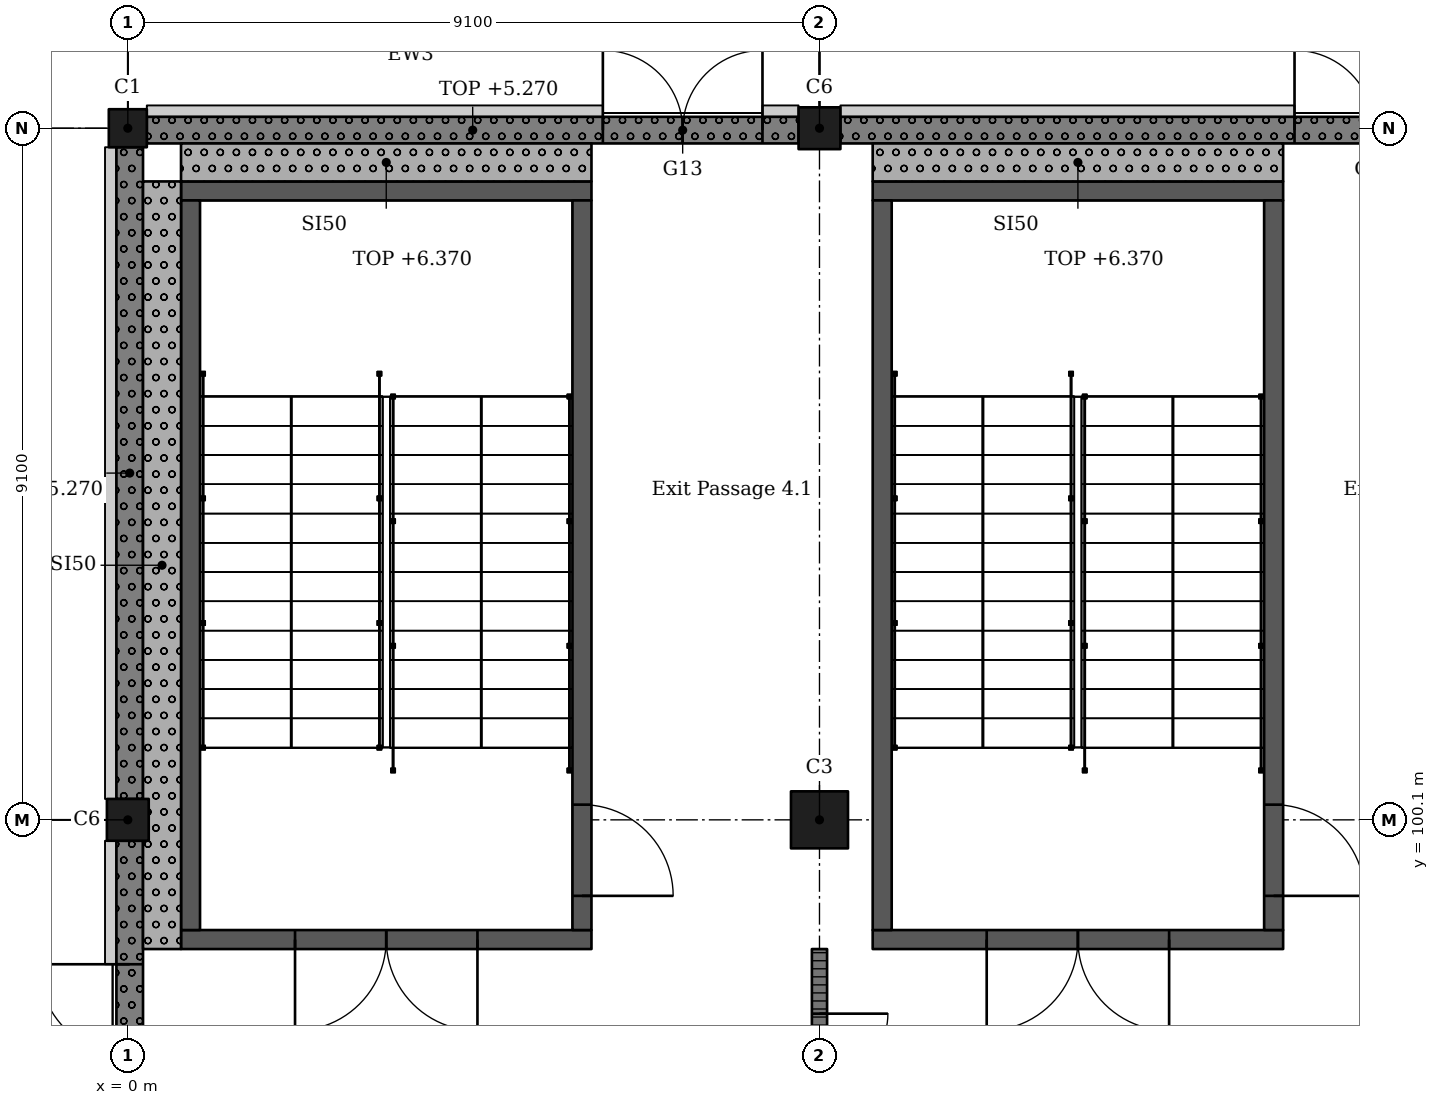
"""IFC4 building model, lengths in metres.
Left out: names, types, materials, properties, quantities, classifications, styles, units other than length and angle.
Written with IfcOpenShell. Run it as: python <this file> out.ifc"""

import sys

from ifc_helpers import new_model, si_unit, direction, frame, frame_2d, origin, origin_2d, place, context, subcontext, project, spatial, rectangle, extrude, element, fill, save


model = new_model("IFC4")
c1 = context("Model", 3, precision=1e-05, world=origin(), true_north=direction((0.0, 1.0)))
c2 = subcontext(c1, "Body", "Model", "MODEL_VIEW")
j1 = project(units=[si_unit("LENGTHUNIT", "METRE"), si_unit("PLANEANGLEUNIT", "RADIAN")], contexts=[c1])
p1 = place(None, origin())
s1 = spatial("IfcSite", under=j1, at=p1, CompositionType="ELEMENT")
p2 = place(p1, origin())
s2 = spatial("IfcBuilding", under=s1, at=p2, CompositionType="ELEMENT")
p3 = place(p2, origin())
s3 = spatial("IfcBuildingStorey", under=s2, at=p3, CompositionType="ELEMENT", Elevation=0.0)
p4 = place(p3, frame((0.0, 100.1, -0.4), z_axis=(0.0, 0.0, 1.0), x_axis=(1.0, 0.0, 0.0)))
e1 = element("IfcColumn", 1, at=p4, inside=s3, PredefinedType="COLUMN", context=c2, shape_type="SweptSolid", body=[
    extrude(rectangle(XDim=0.55, YDim=0.55, at=origin_2d()), origin(), (0.0, 0.0, 1.0), 6.77),
])
p5 = place(p3, frame((0.0, 109.2, -0.4), z_axis=(0.0, 0.0, 1.0), x_axis=(1.0, 0.0, 0.0)))
e2 = element("IfcColumn", 2, at=p5, inside=s3, PredefinedType="COLUMN", context=c2, shape_type="SweptSolid", body=[
    extrude(rectangle(XDim=0.5, YDim=0.5, at=origin_2d()), origin(), (0.0, 0.0, 1.0), 6.77),
])
p6 = place(p3, frame((9.1, 100.1, -0.4), z_axis=(0.0, 0.0, 1.0), x_axis=(1.0, 0.0, 0.0)))
e3 = element("IfcColumn", 3, at=p6, inside=s3, PredefinedType="COLUMN", context=c2, shape_type="SweptSolid", body=[
    extrude(rectangle(XDim=0.75, YDim=0.75, at=origin_2d()), origin(), (0.0, 0.0, 1.0), 6.77),
])
p7 = place(p3, frame((9.1, 109.2, -0.4), z_axis=(0.0, 0.0, 1.0), x_axis=(1.0, 0.0, 0.0)))
e4 = element("IfcColumn", 4, at=p7, inside=s3, PredefinedType="COLUMN", context=c2, shape_type="SweptSolid", body=[
    extrude(rectangle(XDim=0.55, YDim=0.55, at=origin_2d()), origin(), (0.0, 0.0, 1.0), 6.77),
])
p8 = place(p3, frame((6.1, 98.525, -0.4), z_axis=(0.0, 0.0, 1.0), x_axis=(-1.0, 0.0, 0.0)))
e5 = element("IfcWall", 5, at=p8, inside=s3, PredefinedType="SHEAR", context=c2, shape_type="SweptSolid", body=[
    extrude(rectangle(XDim=5.4, YDim=0.25, at=frame_2d((2.7, 0.0))), origin(), (0.0, 0.0, 1.0), 6.77),
])
p9 = place(p8, frame((1.5, 0.0, 0.4)))
e6 = element("IfcOpeningElement", 6, at=p9, cuts=e5, PredefinedType="OPENING", context=c2, shape_type="SweptSolid", body=[
    extrude(rectangle(XDim=2.4, YDim=2.1, at=frame_2d((1.2, 1.05))), frame((0.0, 0.135, 0.0), z_axis=(0.0, -1.0, 0.0), x_axis=(1.0, 0.0, 0.0)), (0.0, 0.0, 1.0), 0.27),
])
p10 = place(p3, frame((6.1, 108.375, -0.4), z_axis=(0.0, 0.0, 1.0), x_axis=(-1.0, 0.0, 0.0)))
e7 = element("IfcWall", 7, at=p10, inside=s3, PredefinedType="SHEAR", context=c2, shape_type="SweptSolid", body=[
    extrude(rectangle(XDim=5.4, YDim=0.25, at=frame_2d((2.7, 0.0))), origin(), (0.0, 0.0, 1.0), 6.77),
])
p11 = place(p3, frame((0.825, 108.25, -0.4), z_axis=(0.0, 0.0, 1.0), x_axis=(0.0, -1.0, 0.0)))
e8 = element("IfcWall", 8, at=p11, inside=s3, PredefinedType="SHEAR", context=c2, shape_type="SweptSolid", body=[
    extrude(rectangle(XDim=9.6, YDim=0.25, at=frame_2d((4.8, 0.0))), origin(), (0.0, 0.0, 1.0), 6.77),
])
p12 = place(p3, frame((5.975, 108.25, -0.4), z_axis=(0.0, 0.0, 1.0), x_axis=(0.0, -1.0, 0.0)))
e9 = element("IfcWall", 9, at=p12, inside=s3, PredefinedType="SHEAR", context=c2, shape_type="SweptSolid", body=[
    extrude(rectangle(XDim=9.6, YDim=0.25, at=frame_2d((4.8, 0.0))), origin(), (0.0, 0.0, 1.0), 6.77),
])
p13 = place(p12, frame((7.95, 0.0, 0.4)))
e10 = element("IfcOpeningElement", 10, at=p13, cuts=e9, PredefinedType="OPENING", context=c2, shape_type="SweptSolid", body=[
    extrude(rectangle(XDim=1.2, YDim=2.1, at=frame_2d((0.6, 1.05))), frame((0.0, 0.135, 0.0), z_axis=(0.0, -1.0, 0.0), x_axis=(1.0, 0.0, 0.0)), (0.0, 0.0, 1.0), 0.27),
])
p14 = place(p3, frame((15.2, 98.525, -0.4), z_axis=(0.0, 0.0, 1.0), x_axis=(-1.0, 0.0, 0.0)))
e11 = element("IfcWall", 11, at=p14, inside=s3, PredefinedType="SHEAR", context=c2, shape_type="SweptSolid", body=[
    extrude(rectangle(XDim=5.4, YDim=0.25, at=frame_2d((2.7, 0.0))), origin(), (0.0, 0.0, 1.0), 6.77),
])
p15 = place(p14, frame((1.5, 0.0, 0.4)))
e12 = element("IfcOpeningElement", 12, at=p15, cuts=e11, PredefinedType="OPENING", context=c2, shape_type="SweptSolid", body=[
    extrude(rectangle(XDim=2.4, YDim=2.1, at=frame_2d((1.2, 1.05))), frame((0.0, 0.135, 0.0), z_axis=(0.0, -1.0, 0.0), x_axis=(1.0, 0.0, 0.0)), (0.0, 0.0, 1.0), 0.27),
])
p16 = place(p3, frame((15.2, 108.375, -0.4), z_axis=(0.0, 0.0, 1.0), x_axis=(-1.0, 0.0, 0.0)))
e13 = element("IfcWall", 13, at=p16, inside=s3, PredefinedType="SHEAR", context=c2, shape_type="SweptSolid", body=[
    extrude(rectangle(XDim=5.4, YDim=0.25, at=frame_2d((2.7, 0.0))), origin(), (0.0, 0.0, 1.0), 6.77),
])
p17 = place(p3, frame((9.925, 108.25, -0.4), z_axis=(0.0, 0.0, 1.0), x_axis=(0.0, -1.0, 0.0)))
e14 = element("IfcWall", 14, at=p17, inside=s3, PredefinedType="SHEAR", context=c2, shape_type="SweptSolid", body=[
    extrude(rectangle(XDim=9.6, YDim=0.25, at=frame_2d((4.8, 0.0))), origin(), (0.0, 0.0, 1.0), 6.77),
])
p18 = place(p3, frame((15.075, 108.25, -0.4), z_axis=(0.0, 0.0, 1.0), x_axis=(0.0, -1.0, 0.0)))
e15 = element("IfcWall", 15, at=p18, inside=s3, PredefinedType="SHEAR", context=c2, shape_type="SweptSolid", body=[
    extrude(rectangle(XDim=9.6, YDim=0.25, at=frame_2d((4.8, 0.0))), origin(), (0.0, 0.0, 1.0), 6.77),
])
p19 = place(p18, frame((7.95, 0.0, 0.4)))
e16 = element("IfcOpeningElement", 16, at=p19, cuts=e15, PredefinedType="OPENING", context=c2, shape_type="SweptSolid", body=[
    extrude(rectangle(XDim=1.2, YDim=2.1, at=frame_2d((0.6, 1.05))), frame((0.0, 0.135, 0.0), z_axis=(0.0, -1.0, 0.0), x_axis=(1.0, 0.0, 0.0)), (0.0, 0.0, 1.0), 0.27),
])
p20 = place(p3, frame((17.925, 109.175, 0.0), z_axis=(0.0, 0.0, 1.0), x_axis=(-1.0, 0.0, 0.0)))
e17 = element("IfcWall", 17, at=p20, inside=s3, PredefinedType="SOLIDWALL", context=c2, shape_type="SweptSolid", body=[
    extrude(rectangle(XDim=8.55, YDim=0.35, at=frame_2d((4.275, 0.0))), origin(), (0.0, 0.0, 1.0), 5.27),
])
p21 = place(p20, frame((0.475, 0.0, 0.0)))
e18 = element("IfcOpeningElement", 18, at=p21, cuts=e17, PredefinedType="OPENING", context=c2, shape_type="SweptSolid", body=[
    extrude(rectangle(XDim=2.1, YDim=2.4, at=frame_2d((1.05, 1.2))), frame((0.0, 0.185, 0.0), z_axis=(0.0, -1.0, 0.0), x_axis=(1.0, 0.0, 0.0)), (0.0, 0.0, 1.0), 0.37),
])
p22 = place(p3, frame((8.825, 109.175, 0.0), z_axis=(0.0, 0.0, 1.0), x_axis=(-1.0, 0.0, 0.0)))
e19 = element("IfcWall", 19, at=p22, inside=s3, PredefinedType="SOLIDWALL", context=c2, shape_type="SweptSolid", body=[
    extrude(rectangle(XDim=8.575, YDim=0.35, at=frame_2d((4.288, 0.0))), origin(), (0.0, 0.0, 1.0), 5.27),
])
p23 = place(p22, frame((0.475, 0.0, 0.0)))
e20 = element("IfcOpeningElement", 20, at=p23, cuts=e19, PredefinedType="OPENING", context=c2, shape_type="SweptSolid", body=[
    extrude(rectangle(XDim=2.1, YDim=2.4, at=frame_2d((1.05, 1.2))), frame((0.0, 0.185, 0.0), z_axis=(0.0, -1.0, 0.0), x_axis=(1.0, 0.0, 0.0)), (0.0, 0.0, 1.0), 0.37),
])
p24 = place(p3, frame((0.025, 108.95, 0.0), z_axis=(0.0, 0.0, 1.0), x_axis=(0.0, -1.0, 0.0)))
e21 = element("IfcWall", 21, at=p24, inside=s3, PredefinedType="SOLIDWALL", context=c2, shape_type="SweptSolid", body=[
    extrude(rectangle(XDim=8.575, YDim=0.35, at=frame_2d((4.288, 0.0))), origin(), (0.0, 0.0, 1.0), 5.27),
])
p25 = place(p3, frame((0.025, 99.825, 0.0), z_axis=(0.0, 0.0, 1.0), x_axis=(0.0, -1.0, 0.0)))
e22 = element("IfcWall", 22, at=p25, inside=s3, PredefinedType="SOLIDWALL", context=c2, shape_type="SweptSolid", body=[
    extrude(rectangle(XDim=8.5, YDim=0.35, at=frame_2d((4.25, 0.0))), origin(), (0.0, 0.0, 1.0), 5.27),
])
p26 = place(p25, frame((1.625, 0.0, 0.0)))
e23 = element("IfcOpeningElement", 23, at=p26, cuts=e22, PredefinedType="OPENING", context=c2, shape_type="SweptSolid", body=[
    extrude(rectangle(XDim=2.4, YDim=2.4, at=frame_2d((1.2, 1.2))), frame((0.0, 0.185, 0.0), z_axis=(0.0, -1.0, 0.0), x_axis=(1.0, 0.0, 0.0)), (0.0, 0.0, 1.0), 0.37),
])
p27 = place(p25, frame((4.625, 0.0, 0.0)))
e24 = element("IfcOpeningElement", 24, at=p27, cuts=e22, PredefinedType="OPENING", context=c2, shape_type="SweptSolid", body=[
    extrude(rectangle(XDim=2.4, YDim=2.4, at=frame_2d((1.2, 1.2))), frame((0.0, 0.185, 0.0), z_axis=(0.0, -1.0, 0.0), x_axis=(1.0, 0.0, 0.0)), (0.0, 0.0, 1.0), 0.37),
])
p28 = place(p3, frame((0.7, 108.75, 0.0), z_axis=(0.0, 0.0, 1.0), x_axis=(1.0, 0.0, 0.0)))
e25 = element("IfcWall", 25, at=p28, inside=s3, PredefinedType="SOLIDWALL", context=c2, shape_type="SweptSolid", body=[
    extrude(rectangle(XDim=5.4, YDim=0.5, at=frame_2d((2.7, 0.0))), origin(), (0.0, 0.0, 1.0), 6.37),
])
p29 = place(p3, frame((0.45, 98.4, 0.0), z_axis=(0.0, 0.0, 1.0), x_axis=(0.0, 1.0, 0.0)))
e26 = element("IfcWall", 26, at=p29, inside=s3, PredefinedType="SOLIDWALL", context=c2, shape_type="SweptSolid", body=[
    extrude(rectangle(XDim=10.1, YDim=0.5, at=frame_2d((5.05, 0.0))), origin(), (0.0, 0.0, 1.0), 6.02),
])
p30 = place(p3, frame((9.8, 108.75, 0.0), z_axis=(0.0, 0.0, 1.0), x_axis=(1.0, 0.0, 0.0)))
e27 = element("IfcWall", 27, at=p30, inside=s3, PredefinedType="SOLIDWALL", context=c2, shape_type="SweptSolid", body=[
    extrude(rectangle(XDim=5.4, YDim=0.5, at=frame_2d((2.7, 0.0))), origin(), (0.0, 0.0, 1.0), 6.37),
])
p31 = place(p3, frame((9.1, 98.4, 0.0), z_axis=(0.0, 0.0, 1.0), x_axis=(0.0, -1.0, 0.0)))
e28 = element("IfcWall", 28, at=p31, inside=s3, PredefinedType="PARTITIONING", context=c2, shape_type="SweptSolid", body=[
    extrude(rectangle(XDim=6.975, YDim=0.2, at=frame_2d((3.487, 0.0))), origin(), (0.0, 0.0, 1.0), 5.32),
])
p32 = place(p31, frame((0.85, 0.0, 0.0)))
e29 = element("IfcOpeningElement", 29, at=p32, cuts=e28, PredefinedType="OPENING", context=c2, shape_type="SweptSolid", body=[
    extrude(rectangle(XDim=1.8, YDim=2.4, at=frame_2d((0.9, 1.2))), frame((0.0, 0.11, 0.0), z_axis=(0.0, -1.0, 0.0), x_axis=(1.0, 0.0, 0.0)), (0.0, 0.0, 1.0), 0.22),
])
p33 = place(p31, frame((4.35, 0.0, 0.0)))
e30 = element("IfcOpeningElement", 30, at=p33, cuts=e28, PredefinedType="OPENING", context=c2, shape_type="SweptSolid", body=[
    extrude(rectangle(XDim=1.8, YDim=2.4, at=frame_2d((0.9, 1.2))), frame((0.0, 0.11, 0.0), z_axis=(0.0, -1.0, 0.0), x_axis=(1.0, 0.0, 0.0)), (0.0, 0.0, 1.0), 0.22),
])
p34 = place(p21, frame((2.1, 0.0, 0.0), z_axis=(0.0, 0.0, 1.0), x_axis=(-1.0, 0.0, 0.0)))
e31 = element("IfcDoor", 31, at=p34, inside=s3, OperationType="DOUBLE_DOOR_SINGLE_SWING", PredefinedType="DOOR", context=c2, shape_type="SweptSolid", body=[
    extrude(rectangle(XDim=2.1, YDim=2.4, at=frame_2d((1.05, 1.2))), frame((0.0, 0.025, 0.0), z_axis=(0.0, -1.0, 0.0), x_axis=(1.0, 0.0, 0.0)), (0.0, 0.0, 1.0), 0.05),
])
fill(e18, e31)
p35 = place(p23, frame((2.1, 0.0, 0.0), z_axis=(0.0, 0.0, 1.0), x_axis=(-1.0, 0.0, 0.0)))
e32 = element("IfcDoor", 32, at=p35, inside=s3, OperationType="DOUBLE_DOOR_SINGLE_SWING", PredefinedType="DOOR", context=c2, shape_type="SweptSolid", body=[
    extrude(rectangle(XDim=2.1, YDim=2.4, at=frame_2d((1.05, 1.2))), frame((0.0, 0.025, 0.0), z_axis=(0.0, -1.0, 0.0), x_axis=(1.0, 0.0, 0.0)), (0.0, 0.0, 1.0), 0.05),
])
fill(e20, e32)
p36 = place(p26, frame((2.4, 0.0, 0.0), z_axis=(0.0, 0.0, 1.0), x_axis=(-1.0, 0.0, 0.0)))
e33 = element("IfcDoor", 33, at=p36, inside=s3, OperationType="DOUBLE_DOOR_SINGLE_SWING", PredefinedType="DOOR", context=c2, shape_type="SweptSolid", body=[
    extrude(rectangle(XDim=2.4, YDim=2.4, at=frame_2d((1.2, 1.2))), frame((0.0, 0.025, 0.0), z_axis=(0.0, -1.0, 0.0), x_axis=(1.0, 0.0, 0.0)), (0.0, 0.0, 1.0), 0.05),
])
fill(e23, e33)
p37 = place(p32, origin())
e34 = element("IfcDoor", 34, at=p37, inside=s3, OperationType="DOUBLE_DOOR_SINGLE_SWING", PredefinedType="DOOR", context=c2, shape_type="SweptSolid", body=[
    extrude(rectangle(XDim=1.8, YDim=2.4, at=frame_2d((0.9, 1.2))), frame((0.0, 0.025, 0.0), z_axis=(0.0, -1.0, 0.0), x_axis=(1.0, 0.0, 0.0)), (0.0, 0.0, 1.0), 0.05),
])
fill(e29, e34)
p38 = place(p9, origin())
e35 = element("IfcDoor", 35, at=p38, inside=s3, OperationType="DOUBLE_DOOR_SINGLE_SWING", PredefinedType="DOOR", context=c2, shape_type="SweptSolid", body=[
    extrude(rectangle(XDim=2.4, YDim=2.1, at=frame_2d((1.2, 1.05))), frame((0.0, 0.025, 0.0), z_axis=(0.0, -1.0, 0.0), x_axis=(1.0, 0.0, 0.0)), (0.0, 0.0, 1.0), 0.05),
])
fill(e6, e35)
p39 = place(p15, origin())
e36 = element("IfcDoor", 36, at=p39, inside=s3, OperationType="DOUBLE_DOOR_SINGLE_SWING", PredefinedType="DOOR", context=c2, shape_type="SweptSolid", body=[
    extrude(rectangle(XDim=2.4, YDim=2.1, at=frame_2d((1.2, 1.05))), frame((0.0, 0.025, 0.0), z_axis=(0.0, -1.0, 0.0), x_axis=(1.0, 0.0, 0.0)), (0.0, 0.0, 1.0), 0.05),
])
fill(e12, e36)
p40 = place(p13, origin())
e37 = element("IfcDoor", 37, at=p40, inside=s3, OperationType="SINGLE_SWING_LEFT", PredefinedType="DOOR", context=c2, shape_type="SweptSolid", body=[
    extrude(rectangle(XDim=1.2, YDim=2.1, at=frame_2d((0.6, 1.05))), frame((0.0, 0.025, 0.0), z_axis=(0.0, -1.0, 0.0), x_axis=(1.0, 0.0, 0.0)), (0.0, 0.0, 1.0), 0.05),
])
fill(e10, e37)
p41 = place(p19, origin())
e38 = element("IfcDoor", 38, at=p41, inside=s3, OperationType="SINGLE_SWING_LEFT", PredefinedType="DOOR", context=c2, shape_type="SweptSolid", body=[
    extrude(rectangle(XDim=1.2, YDim=2.1, at=frame_2d((0.6, 1.05))), frame((0.0, 0.025, 0.0), z_axis=(0.0, -1.0, 0.0), x_axis=(1.0, 0.0, 0.0)), (0.0, 0.0, 1.0), 0.05),
])
fill(e16, e38)
save(model, sys.argv[1])
